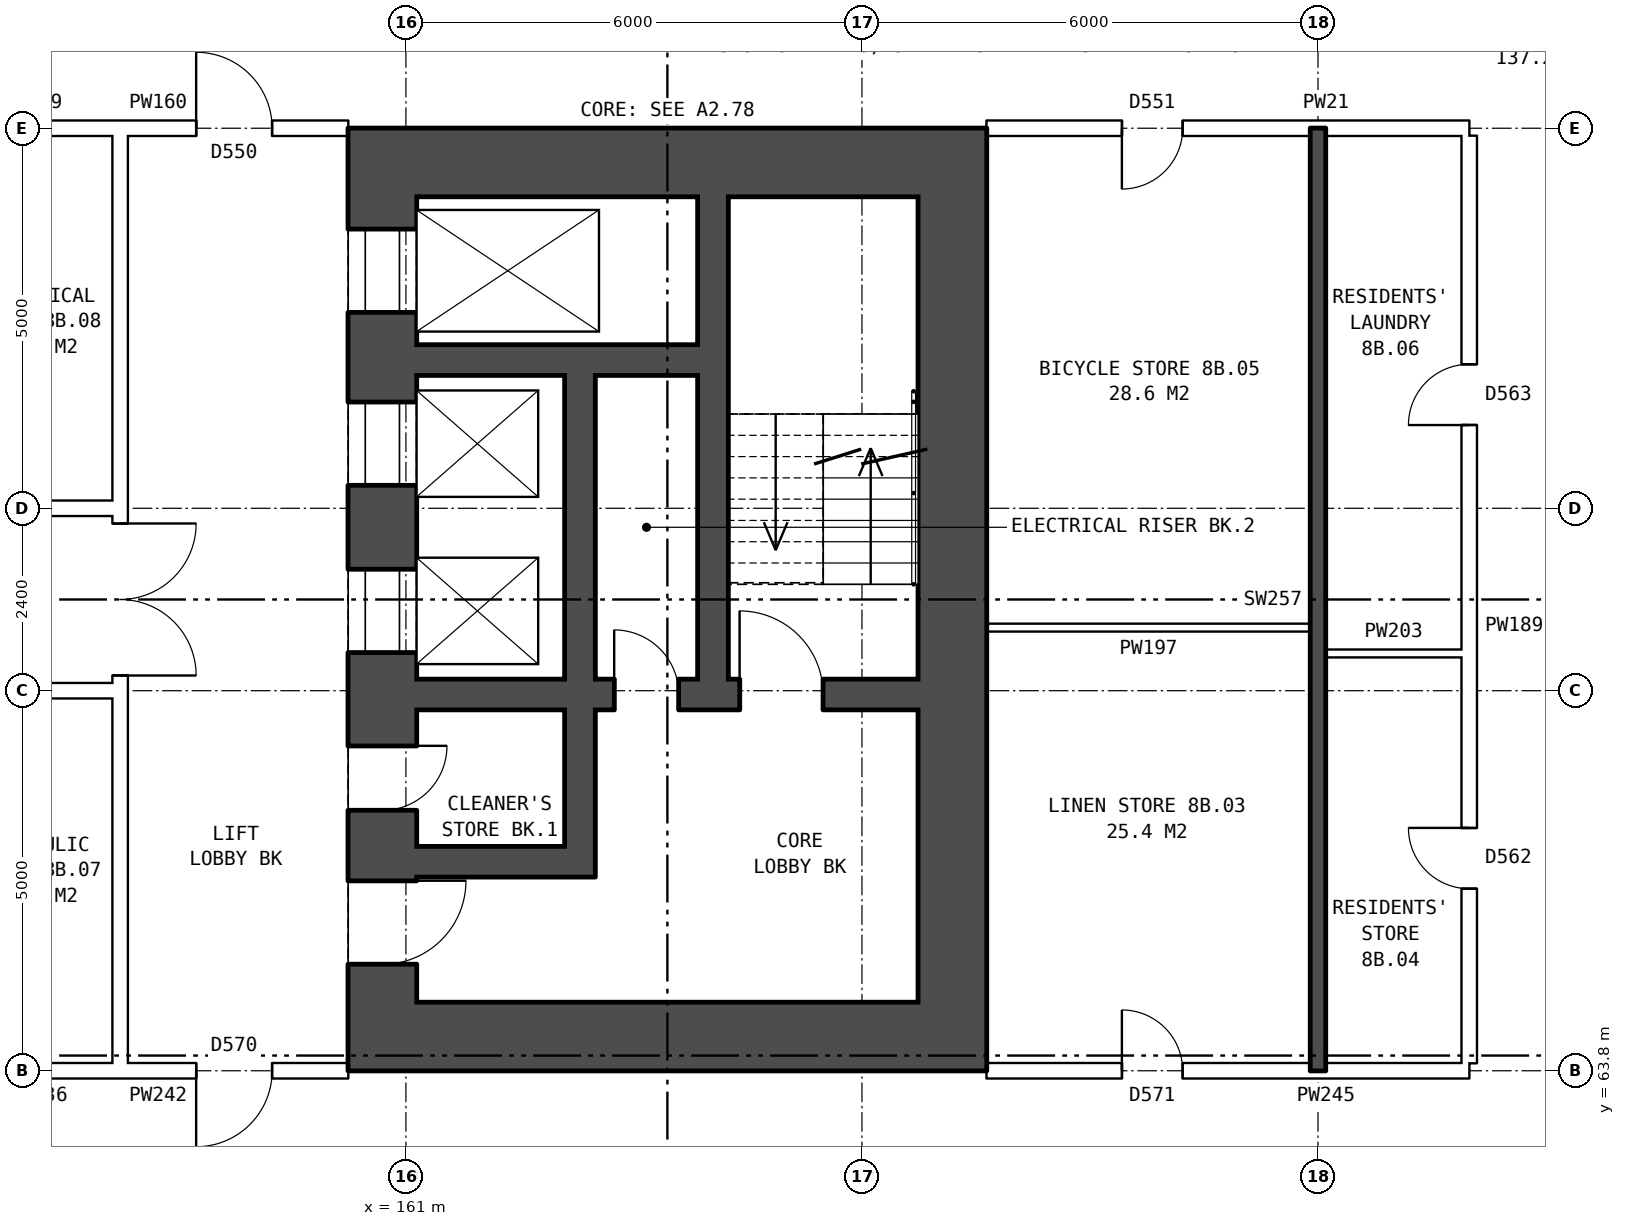
"""IFC4 building model, lengths in metres.
Left out: names, types, materials, properties, quantities, classifications, styles, units other than length and angle.
Written with IfcOpenShell. Run it as: python <this file> out.ifc"""

import sys

from ifc_helpers import new_model, si_unit, direction, frame, frame_2d, origin, place, context, subcontext, project, spatial, rectangle, extrude, element, fill, save


model = new_model("IFC4")
c1 = context("Model", 3, precision=1e-05, world=origin(), true_north=direction((0.0, 1.0)))
c2 = subcontext(c1, "Body", "Model", "MODEL_VIEW")
j1 = project(units=[si_unit("LENGTHUNIT", "METRE"), si_unit("PLANEANGLEUNIT", "RADIAN")], contexts=[c1])
p1 = place(None, origin())
s1 = spatial("IfcSite", under=j1, at=p1, CompositionType="ELEMENT")
p2 = place(p1, origin())
s2 = spatial("IfcBuilding", under=s1, at=p2, CompositionType="ELEMENT")
p3 = place(p2, frame((0.0, 0.0, 31.9)))
s3 = spatial("IfcBuildingStorey", under=s2, at=p3, CompositionType="ELEMENT", Elevation=31.9)
p4 = place(p3, frame((160.69, 75.3, 0.0), z_axis=(0.0, 0.0, 1.0), x_axis=(0.0, -1.0, 0.0)))
e1 = element("IfcWall", 1, at=p4, inside=s3, PredefinedType="SHEAR", context=c2, shape_type="SweptSolid", body=[
    extrude(rectangle(XDim=10.6, YDim=0.9, at=frame_2d((5.3, 0.0))), origin(), (0.0, 0.0, 1.0), 2.85),
])
p5 = place(p4, frame((0.425, 0.0, 0.0)))
e2 = element("IfcOpeningElement", 2, at=p5, cuts=e1, PredefinedType="OPENING", context=c2, shape_type="SweptSolid", body=[
    extrude(rectangle(XDim=1.1, YDim=2.1, at=frame_2d((0.55, 1.05))), frame((0.0, 0.46, 0.0), z_axis=(0.0, -1.0, 0.0), x_axis=(1.0, 0.0, 0.0)), (0.0, 0.0, 1.0), 0.92),
])
p6 = place(p4, frame((2.7, 0.0, 0.0)))
e3 = element("IfcOpeningElement", 3, at=p6, cuts=e1, PredefinedType="OPENING", context=c2, shape_type="SweptSolid", body=[
    extrude(rectangle(XDim=1.1, YDim=2.1, at=frame_2d((0.55, 1.05))), frame((0.0, 0.46, 0.0), z_axis=(0.0, -1.0, 0.0), x_axis=(1.0, 0.0, 0.0)), (0.0, 0.0, 1.0), 0.92),
])
p7 = place(p4, frame((4.9, 0.0, 0.0)))
e4 = element("IfcOpeningElement", 4, at=p7, cuts=e1, PredefinedType="OPENING", context=c2, shape_type="SweptSolid", body=[
    extrude(rectangle(XDim=1.1, YDim=2.1, at=frame_2d((0.55, 1.05))), frame((0.0, 0.46, 0.0), z_axis=(0.0, -1.0, 0.0), x_axis=(1.0, 0.0, 0.0)), (0.0, 0.0, 1.0), 0.92),
])
p8 = place(p4, frame((9.0, 0.0, 0.0)))
e5 = element("IfcOpeningElement", 5, at=p8, cuts=e1, PredefinedType="OPENING", context=c2, shape_type="SweptSolid", body=[
    extrude(rectangle(XDim=1.1, YDim=2.1, at=frame_2d((0.55, 1.05))), frame((0.0, 0.46, 0.0), z_axis=(0.0, -1.0, 0.0), x_axis=(1.0, 0.0, 0.0)), (0.0, 0.0, 1.0), 0.92),
])
p9 = place(p4, frame((7.225, 0.0, 0.0)))
e6 = element("IfcOpeningElement", 6, at=p9, cuts=e1, PredefinedType="OPENING", context=c2, shape_type="SweptSolid", body=[
    extrude(rectangle(XDim=0.85, YDim=2.1, at=frame_2d((0.425, 1.05))), frame((0.0, 0.46, 0.0), z_axis=(0.0, -1.0, 0.0), x_axis=(1.0, 0.0, 0.0)), (0.0, 0.0, 1.0), 0.92),
])
p10 = place(p3, frame((168.19, 75.3, 0.0), z_axis=(0.0, 0.0, 1.0), x_axis=(0.0, -1.0, 0.0)))
e7 = element("IfcWall", 7, at=p10, inside=s3, PredefinedType="SHEAR", context=c2, shape_type="SweptSolid", body=[
    extrude(rectangle(XDim=10.6, YDim=0.9, at=frame_2d((5.3, 0.0))), origin(), (0.0, 0.0, 1.0), 2.85),
])
for number, where, z_axis, x_axis in (
    (8, (160.24, 75.75, 0.0), (0.0, 0.0, 1.0), (1.0, 0.0, 0.0)),
    (9, (160.24, 64.25, 0.0), (0.0, 0.0, 1.0), (1.0, 0.0, 0.0)),
):
    element("IfcWall", number, at=place(p3, frame(where, z_axis=z_axis, x_axis=x_axis)), inside=s3, PredefinedType="SHEAR", context=c2, shape_type="SweptSolid", body=[
        extrude(rectangle(XDim=8.4, YDim=0.9, at=frame_2d((4.2, 0.0))), origin(), (0.0, 0.0, 1.0), 2.85),
    ])
p11 = place(p3, frame((161.14, 73.15, 0.0), z_axis=(0.0, 0.0, 1.0), x_axis=(1.0, 0.0, 0.0)))
e10 = element("IfcWall", 10, at=p11, inside=s3, PredefinedType="SHEAR", context=c2, shape_type="SweptSolid", body=[
    extrude(rectangle(XDim=3.7, YDim=0.4, at=frame_2d((1.85, 0.0))), origin(), (0.0, 0.0, 1.0), 2.85),
])
p12 = place(p3, frame((161.14, 68.75, 0.0), z_axis=(0.0, 0.0, 1.0), x_axis=(1.0, 0.0, 0.0)))
e11 = element("IfcWall", 11, at=p12, inside=s3, PredefinedType="SHEAR", context=c2, shape_type="SweptSolid", body=[
    extrude(rectangle(XDim=6.6, YDim=0.4, at=frame_2d((3.3, 0.0))), origin(), (0.0, 0.0, 1.0), 2.85),
])
p13 = place(p12, frame((4.25, 0.0, 0.0)))
e12 = element("IfcOpeningElement", 12, at=p13, cuts=e11, PredefinedType="OPENING", context=c2, shape_type="SweptSolid", body=[
    extrude(rectangle(XDim=1.1, YDim=2.1, at=frame_2d((0.55, 1.05))), frame((0.0, 0.21, 0.0), z_axis=(0.0, -1.0, 0.0), x_axis=(1.0, 0.0, 0.0)), (0.0, 0.0, 1.0), 0.42),
])
p14 = place(p12, frame((2.6, 0.0, 0.0)))
e13 = element("IfcOpeningElement", 13, at=p14, cuts=e11, PredefinedType="OPENING", context=c2, shape_type="SweptSolid", body=[
    extrude(rectangle(XDim=0.85, YDim=2.1, at=frame_2d((0.425, 1.05))), frame((0.0, 0.21, 0.0), z_axis=(0.0, -1.0, 0.0), x_axis=(1.0, 0.0, 0.0)), (0.0, 0.0, 1.0), 0.42),
])
p15 = place(p3, frame((161.14, 66.55, 0.0), z_axis=(0.0, 0.0, 1.0), x_axis=(1.0, 0.0, 0.0)))
e14 = element("IfcWall", 14, at=p15, inside=s3, PredefinedType="SHEAR", context=c2, shape_type="SweptSolid", body=[
    extrude(rectangle(XDim=1.95, YDim=0.4, at=frame_2d((0.975, 0.0))), origin(), (0.0, 0.0, 1.0), 2.85),
])
p16 = place(p3, frame((163.29, 72.95, 0.0), z_axis=(0.0, 0.0, 1.0), x_axis=(0.0, -1.0, 0.0)))
e15 = element("IfcWall", 15, at=p16, inside=s3, PredefinedType="SHEAR", context=c2, shape_type="SweptSolid", body=[
    extrude(rectangle(XDim=4.0, YDim=0.4, at=frame_2d((2.0, 0.0))), origin(), (0.0, 0.0, 1.0), 2.85),
])
p17 = place(p3, frame((163.29, 68.55, 0.0), z_axis=(0.0, 0.0, 1.0), x_axis=(0.0, -1.0, 0.0)))
e16 = element("IfcWall", 16, at=p17, inside=s3, PredefinedType="SHEAR", context=c2, shape_type="SweptSolid", body=[
    extrude(rectangle(XDim=2.2, YDim=0.4, at=frame_2d((1.1, 0.0))), origin(), (0.0, 0.0, 1.0), 2.85),
])
p18 = place(p3, frame((165.04, 75.3, 0.0), z_axis=(0.0, 0.0, 1.0), x_axis=(0.0, -1.0, 0.0)))
e17 = element("IfcWall", 17, at=p18, inside=s3, PredefinedType="SHEAR", context=c2, shape_type="SweptSolid", body=[
    extrude(rectangle(XDim=6.35, YDim=0.4, at=frame_2d((3.175, 0.0))), origin(), (0.0, 0.0, 1.0), 2.85),
])
p19 = place(p3, frame((157.24, 63.9, 0.0), z_axis=(0.0, 0.0, 1.0), x_axis=(0.0, 1.0, 0.0)))
e18 = element("IfcWall", 18, at=p19, inside=s3, PredefinedType="PARTITIONING", context=c2, shape_type="SweptSolid", body=[
    extrude(rectangle(XDim=12.2, YDim=0.2, at=frame_2d((6.1, 0.0))), origin(), (0.0, 0.0, 1.0), 2.85),
])
p20 = place(p19, frame((5.1, 0.0, 0.0)))
e19 = element("IfcOpeningElement", 19, at=p20, cuts=e18, PredefinedType="OPENING", context=c2, shape_type="SweptSolid", body=[
    extrude(rectangle(XDim=2.0, YDim=2.1, at=frame_2d((1.0, 1.05))), frame((0.0, 0.11, 0.0), z_axis=(0.0, -1.0, 0.0), x_axis=(1.0, 0.0, 0.0)), (0.0, 0.0, 1.0), 0.22),
])
p21 = place(p3, frame((155.1, 63.8, 0.0), z_axis=(0.0, 0.0, 1.0), x_axis=(1.0, 0.0, 0.0)))
e20 = element("IfcWall", 20, at=p21, inside=s3, PredefinedType="PARTITIONING", context=c2, shape_type="SweptSolid", body=[
    extrude(rectangle(XDim=2.14, YDim=0.2, at=frame_2d((1.07, 0.0))), origin(), (0.0, 0.0, 1.0), 2.85),
])
p22 = place(p3, frame((157.24, 63.8, 0.0), z_axis=(0.0, 0.0, 1.0), x_axis=(1.0, 0.0, 0.0)))
e21 = element("IfcWall", 21, at=p22, inside=s3, PredefinedType="PARTITIONING", context=c2, shape_type="SweptSolid", body=[
    extrude(rectangle(XDim=3.0, YDim=0.2, at=frame_2d((1.5, 0.0))), origin(), (0.0, 0.0, 1.0), 2.85),
])
p23 = place(p22, frame((1.0, 0.0, 0.0)))
e22 = element("IfcOpeningElement", 22, at=p23, cuts=e21, PredefinedType="OPENING", context=c2, shape_type="SweptSolid", body=[
    extrude(rectangle(XDim=1.0, YDim=2.1, at=frame_2d((0.5, 1.05))), frame((0.0, 0.11, 0.0), z_axis=(0.0, -1.0, 0.0), x_axis=(1.0, 0.0, 0.0)), (0.0, 0.0, 1.0), 0.22),
])
p24 = place(p3, frame((168.64, 63.8, 0.0), z_axis=(0.0, 0.0, 1.0), x_axis=(1.0, 0.0, 0.0)))
e23 = element("IfcWall", 23, at=p24, inside=s3, PredefinedType="PARTITIONING", context=c2, shape_type="SweptSolid", body=[
    extrude(rectangle(XDim=6.35, YDim=0.2, at=frame_2d((3.175, 0.0))), origin(), (0.0, 0.0, 1.0), 2.85),
])
p25 = place(p24, frame((1.78, 0.0, 0.0)))
e24 = element("IfcOpeningElement", 24, at=p25, cuts=e23, PredefinedType="OPENING", context=c2, shape_type="SweptSolid", body=[
    extrude(rectangle(XDim=0.8, YDim=2.1, at=frame_2d((0.4, 1.05))), frame((0.0, 0.11, 0.0), z_axis=(0.0, -1.0, 0.0), x_axis=(1.0, 0.0, 0.0)), (0.0, 0.0, 1.0), 0.22),
])
p26 = place(p3, frame((142.76, 68.8, 0.0), z_axis=(0.0, 0.0, 1.0), x_axis=(1.0, 0.0, 0.0)))
e25 = element("IfcWall", 25, at=p26, inside=s3, PredefinedType="PARTITIONING", context=c2, shape_type="SweptSolid", body=[
    extrude(rectangle(XDim=14.48, YDim=0.2, at=frame_2d((7.24, 0.0))), origin(), (0.0, 0.0, 1.0), 2.85),
])
p27 = place(p26, frame((1.12, 0.0, 0.0)))
e26 = element("IfcOpeningElement", 26, at=p27, cuts=e25, PredefinedType="OPENING", context=c2, shape_type="SweptSolid", body=[
    extrude(rectangle(XDim=1.0, YDim=2.1, at=frame_2d((0.5, 1.05))), frame((0.0, 0.11, 0.0), z_axis=(0.0, -1.0, 0.0), x_axis=(1.0, 0.0, 0.0)), (0.0, 0.0, 1.0), 0.22),
])
p28 = place(p26, frame((7.24, 0.0, 0.0)))
e27 = element("IfcOpeningElement", 27, at=p28, cuts=e25, PredefinedType="OPENING", context=c2, shape_type="SweptSolid", body=[
    extrude(rectangle(XDim=1.0, YDim=2.1, at=frame_2d((0.5, 1.05))), frame((0.0, 0.11, 0.0), z_axis=(0.0, -1.0, 0.0), x_axis=(1.0, 0.0, 0.0)), (0.0, 0.0, 1.0), 0.22),
])
p29 = place(p3, frame((173.1, 69.29, 0.0), z_axis=(0.0, 0.0, 1.0), x_axis=(1.0, 0.0, 0.0)))
e28 = element("IfcWall", 28, at=p29, inside=s3, PredefinedType="PARTITIONING", context=c2, shape_type="SweptSolid", body=[
    extrude(rectangle(XDim=1.79, YDim=0.1, at=frame_2d((0.895, 0.0))), origin(), (0.0, 0.0, 1.0), 2.85),
])
p30 = place(p3, frame((168.64, 69.63, 0.0), z_axis=(0.0, 0.0, 1.0), x_axis=(1.0, 0.0, 0.0)))
e29 = element("IfcWall", 29, at=p30, inside=s3, PredefinedType="PARTITIONING", context=c2, shape_type="SweptSolid", body=[
    extrude(rectangle(XDim=4.26, YDim=0.1, at=frame_2d((2.13, 0.0))), origin(), (0.0, 0.0, 1.0), 2.85),
])
p31 = place(p3, frame((142.76, 71.2, 0.0), z_axis=(0.0, 0.0, 1.0), x_axis=(1.0, 0.0, 0.0)))
e30 = element("IfcWall", 30, at=p31, inside=s3, PredefinedType="PARTITIONING", context=c2, shape_type="SweptSolid", body=[
    extrude(rectangle(XDim=14.48, YDim=0.2, at=frame_2d((7.24, 0.0))), origin(), (0.0, 0.0, 1.0), 2.85),
])
p32 = place(p31, frame((1.12, 0.0, 0.0)))
e31 = element("IfcOpeningElement", 31, at=p32, cuts=e30, PredefinedType="OPENING", context=c2, shape_type="SweptSolid", body=[
    extrude(rectangle(XDim=1.0, YDim=2.1, at=frame_2d((0.5, 1.05))), frame((0.0, 0.11, 0.0), z_axis=(0.0, -1.0, 0.0), x_axis=(1.0, 0.0, 0.0)), (0.0, 0.0, 1.0), 0.22),
])
p33 = place(p31, frame((10.24, 0.0, 0.0)))
e32 = element("IfcOpeningElement", 32, at=p33, cuts=e30, PredefinedType="OPENING", context=c2, shape_type="SweptSolid", body=[
    extrude(rectangle(XDim=1.0, YDim=2.1, at=frame_2d((0.5, 1.05))), frame((0.0, 0.11, 0.0), z_axis=(0.0, -1.0, 0.0), x_axis=(1.0, 0.0, 0.0)), (0.0, 0.0, 1.0), 0.22),
])
p34 = place(p3, frame((155.1, 76.2, 0.0), z_axis=(0.0, 0.0, 1.0), x_axis=(1.0, 0.0, 0.0)))
e33 = element("IfcWall", 33, at=p34, inside=s3, PredefinedType="PARTITIONING", context=c2, shape_type="SweptSolid", body=[
    extrude(rectangle(XDim=2.14, YDim=0.2, at=frame_2d((1.07, 0.0))), origin(), (0.0, 0.0, 1.0), 2.85),
])
p35 = place(p3, frame((157.24, 76.2, 0.0), z_axis=(0.0, 0.0, 1.0), x_axis=(1.0, 0.0, 0.0)))
e34 = element("IfcWall", 34, at=p35, inside=s3, PredefinedType="PARTITIONING", context=c2, shape_type="SweptSolid", body=[
    extrude(rectangle(XDim=3.0, YDim=0.2, at=frame_2d((1.5, 0.0))), origin(), (0.0, 0.0, 1.0), 2.85),
])
p36 = place(p35, frame((1.0, 0.0, 0.0)))
e35 = element("IfcOpeningElement", 35, at=p36, cuts=e34, PredefinedType="OPENING", context=c2, shape_type="SweptSolid", body=[
    extrude(rectangle(XDim=1.0, YDim=2.1, at=frame_2d((0.5, 1.05))), frame((0.0, 0.11, 0.0), z_axis=(0.0, -1.0, 0.0), x_axis=(1.0, 0.0, 0.0)), (0.0, 0.0, 1.0), 0.22),
])
p37 = place(p3, frame((168.64, 76.2, 0.0), z_axis=(0.0, 0.0, 1.0), x_axis=(1.0, 0.0, 0.0)))
e36 = element("IfcWall", 36, at=p37, inside=s3, PredefinedType="PARTITIONING", context=c2, shape_type="SweptSolid", body=[
    extrude(rectangle(XDim=6.35, YDim=0.2, at=frame_2d((3.175, 0.0))), origin(), (0.0, 0.0, 1.0), 2.85),
])
p38 = place(p37, frame((1.78, 0.0, 0.0)))
e37 = element("IfcOpeningElement", 37, at=p38, cuts=e36, PredefinedType="OPENING", context=c2, shape_type="SweptSolid", body=[
    extrude(rectangle(XDim=0.8, YDim=2.1, at=frame_2d((0.4, 1.05))), frame((0.0, 0.11, 0.0), z_axis=(0.0, -1.0, 0.0), x_axis=(1.0, 0.0, 0.0)), (0.0, 0.0, 1.0), 0.22),
])
p39 = place(p3, frame((173.0, 63.8, 0.0), z_axis=(0.0, 0.0, 1.0), x_axis=(0.0, 1.0, 0.0)))
e38 = element("IfcWall", 38, at=p39, inside=s3, PredefinedType="SOLIDWALL", context=c2, shape_type="SweptSolid", body=[
    extrude(rectangle(XDim=12.4, YDim=0.2, at=frame_2d((6.2, 0.0))), origin(), (0.0, 0.0, 1.0), 2.85),
])
p40 = place(p3, frame((174.99, 63.9, 0.0), z_axis=(0.0, 0.0, 1.0), x_axis=(0.0, 1.0, 0.0)))
e39 = element("IfcWall", 39, at=p40, inside=s3, PredefinedType="PARTITIONING", context=c2, shape_type="SweptSolid", body=[
    extrude(rectangle(XDim=12.2, YDim=0.2, at=frame_2d((6.1, 0.0))), origin(), (0.0, 0.0, 1.0), 2.85),
])
p41 = place(p40, frame((2.295, 0.0, 0.0)))
e40 = element("IfcOpeningElement", 40, at=p41, cuts=e39, PredefinedType="OPENING", context=c2, shape_type="SweptSolid", body=[
    extrude(rectangle(XDim=0.8, YDim=2.1, at=frame_2d((0.4, 1.05))), frame((0.0, 0.11, 0.0), z_axis=(0.0, -1.0, 0.0), x_axis=(1.0, 0.0, 0.0)), (0.0, 0.0, 1.0), 0.22),
])
p42 = place(p40, frame((8.395, 0.0, 0.0)))
e41 = element("IfcOpeningElement", 41, at=p42, cuts=e39, PredefinedType="OPENING", context=c2, shape_type="SweptSolid", body=[
    extrude(rectangle(XDim=0.8, YDim=2.1, at=frame_2d((0.4, 1.05))), frame((0.0, 0.11, 0.0), z_axis=(0.0, -1.0, 0.0), x_axis=(1.0, 0.0, 0.0)), (0.0, 0.0, 1.0), 0.22),
])
p43 = place(p5, origin())
e42 = element("IfcDoor", 42, at=p43, inside=s3, OperationType="DOUBLE_DOOR_SLIDING", PredefinedType="DOOR", context=c2, shape_type="SweptSolid", body=[
    extrude(rectangle(XDim=1.1, YDim=2.1, at=frame_2d((0.55, 1.05))), frame((0.0, 0.435, 0.0), z_axis=(0.0, -1.0, 0.0), x_axis=(1.0, 0.0, 0.0)), (0.0, 0.0, 1.0), 0.05),
])
fill(e2, e42)
p44 = place(p6, origin())
e43 = element("IfcDoor", 43, at=p44, inside=s3, OperationType="DOUBLE_DOOR_SLIDING", PredefinedType="DOOR", context=c2, shape_type="SweptSolid", body=[
    extrude(rectangle(XDim=1.1, YDim=2.1, at=frame_2d((0.55, 1.05))), frame((0.0, 0.435, 0.0), z_axis=(0.0, -1.0, 0.0), x_axis=(1.0, 0.0, 0.0)), (0.0, 0.0, 1.0), 0.05),
])
fill(e3, e43)
p45 = place(p7, origin())
e44 = element("IfcDoor", 44, at=p45, inside=s3, OperationType="DOUBLE_DOOR_SLIDING", PredefinedType="DOOR", context=c2, shape_type="SweptSolid", body=[
    extrude(rectangle(XDim=1.1, YDim=2.1, at=frame_2d((0.55, 1.05))), frame((0.0, 0.435, 0.0), z_axis=(0.0, -1.0, 0.0), x_axis=(1.0, 0.0, 0.0)), (0.0, 0.0, 1.0), 0.05),
])
fill(e4, e44)
p46 = place(p8, origin())
e45 = element("IfcDoor", 45, at=p46, inside=s3, OperationType="SINGLE_SWING_LEFT", PredefinedType="DOOR", context=c2, shape_type="SweptSolid", body=[
    extrude(rectangle(XDim=1.1, YDim=2.1, at=frame_2d((0.55, 1.05))), frame((0.0, 0.435, 0.0), z_axis=(0.0, -1.0, 0.0), x_axis=(1.0, 0.0, 0.0)), (0.0, 0.0, 1.0), 0.05),
])
fill(e5, e45)
p47 = place(p13, origin())
e46 = element("IfcDoor", 46, at=p47, inside=s3, OperationType="SINGLE_SWING_LEFT", PredefinedType="DOOR", context=c2, shape_type="SweptSolid", body=[
    extrude(rectangle(XDim=1.1, YDim=2.1, at=frame_2d((0.55, 1.05))), frame((0.0, 0.025, 0.0), z_axis=(0.0, -1.0, 0.0), x_axis=(1.0, 0.0, 0.0)), (0.0, 0.0, 1.0), 0.05),
])
fill(e12, e46)
p48 = place(p9, origin())
e47 = element("IfcDoor", 47, at=p48, inside=s3, OperationType="SINGLE_SWING_LEFT", PredefinedType="DOOR", context=c2, shape_type="SweptSolid", body=[
    extrude(rectangle(XDim=0.85, YDim=2.1, at=frame_2d((0.425, 1.05))), frame((0.0, 0.435, 0.0), z_axis=(0.0, -1.0, 0.0), x_axis=(1.0, 0.0, 0.0)), (0.0, 0.0, 1.0), 0.05),
])
fill(e6, e47)
p49 = place(p14, origin())
e48 = element("IfcDoor", 48, at=p49, inside=s3, OperationType="SINGLE_SWING_LEFT", PredefinedType="DOOR", context=c2, shape_type="SweptSolid", body=[
    extrude(rectangle(XDim=0.85, YDim=2.1, at=frame_2d((0.425, 1.05))), frame((0.0, 0.025, 0.0), z_axis=(0.0, -1.0, 0.0), x_axis=(1.0, 0.0, 0.0)), (0.0, 0.0, 1.0), 0.05),
])
fill(e13, e48)
p50 = place(p20, frame((2.0, 0.0, 0.0), z_axis=(0.0, 0.0, 1.0), x_axis=(-1.0, 0.0, 0.0)))
e49 = element("IfcDoor", 49, at=p50, inside=s3, OperationType="DOUBLE_DOOR_SINGLE_SWING", PredefinedType="DOOR", context=c2, shape_type="SweptSolid", body=[
    extrude(rectangle(XDim=2.0, YDim=2.1, at=frame_2d((1.0, 1.05))), frame((0.0, 0.025, 0.0), z_axis=(0.0, -1.0, 0.0), x_axis=(1.0, 0.0, 0.0)), (0.0, 0.0, 1.0), 0.05),
])
fill(e19, e49)
p51 = place(p23, frame((1.0, 0.0, 0.0), z_axis=(0.0, 0.0, 1.0), x_axis=(-1.0, 0.0, 0.0)))
e50 = element("IfcDoor", 50, at=p51, inside=s3, OperationType="SINGLE_SWING_RIGHT", PredefinedType="DOOR", context=c2, shape_type="SweptSolid", body=[
    extrude(rectangle(XDim=1.0, YDim=2.1, at=frame_2d((0.5, 1.05))), frame((0.0, 0.025, 0.0), z_axis=(0.0, -1.0, 0.0), x_axis=(1.0, 0.0, 0.0)), (0.0, 0.0, 1.0), 0.05),
])
fill(e22, e50)
p52 = place(p36, origin())
e51 = element("IfcDoor", 51, at=p52, inside=s3, OperationType="SINGLE_SWING_LEFT", PredefinedType="DOOR", context=c2, shape_type="SweptSolid", body=[
    extrude(rectangle(XDim=1.0, YDim=2.1, at=frame_2d((0.5, 1.05))), frame((0.0, 0.025, 0.0), z_axis=(0.0, -1.0, 0.0), x_axis=(1.0, 0.0, 0.0)), (0.0, 0.0, 1.0), 0.05),
])
fill(e35, e51)
p53 = place(p25, origin())
e52 = element("IfcDoor", 52, at=p53, inside=s3, OperationType="SINGLE_SWING_LEFT", PredefinedType="DOOR", context=c2, shape_type="SweptSolid", body=[
    extrude(rectangle(XDim=0.8, YDim=2.1, at=frame_2d((0.4, 1.05))), frame((0.0, 0.025, 0.0), z_axis=(0.0, -1.0, 0.0), x_axis=(1.0, 0.0, 0.0)), (0.0, 0.0, 1.0), 0.05),
])
fill(e24, e52)
p54 = place(p41, origin())
e53 = element("IfcDoor", 53, at=p54, inside=s3, OperationType="SINGLE_SWING_RIGHT", PredefinedType="DOOR", context=c2, shape_type="SweptSolid", body=[
    extrude(rectangle(XDim=0.8, YDim=2.1, at=frame_2d((0.4, 1.05))), frame((0.0, 0.025, 0.0), z_axis=(0.0, -1.0, 0.0), x_axis=(1.0, 0.0, 0.0)), (0.0, 0.0, 1.0), 0.05),
])
fill(e40, e53)
p55 = place(p38, frame((0.8, 0.0, 0.0), z_axis=(0.0, 0.0, 1.0), x_axis=(-1.0, 0.0, 0.0)))
e54 = element("IfcDoor", 54, at=p55, inside=s3, OperationType="SINGLE_SWING_RIGHT", PredefinedType="DOOR", context=c2, shape_type="SweptSolid", body=[
    extrude(rectangle(XDim=0.8, YDim=2.1, at=frame_2d((0.4, 1.05))), frame((0.0, 0.025, 0.0), z_axis=(0.0, -1.0, 0.0), x_axis=(1.0, 0.0, 0.0)), (0.0, 0.0, 1.0), 0.05),
])
fill(e37, e54)
p56 = place(p42, origin())
e55 = element("IfcDoor", 55, at=p56, inside=s3, OperationType="SINGLE_SWING_LEFT", PredefinedType="DOOR", context=c2, shape_type="SweptSolid", body=[
    extrude(rectangle(XDim=0.8, YDim=2.1, at=frame_2d((0.4, 1.05))), frame((0.0, 0.025, 0.0), z_axis=(0.0, -1.0, 0.0), x_axis=(1.0, 0.0, 0.0)), (0.0, 0.0, 1.0), 0.05),
])
fill(e41, e55)
save(model, sys.argv[1])
